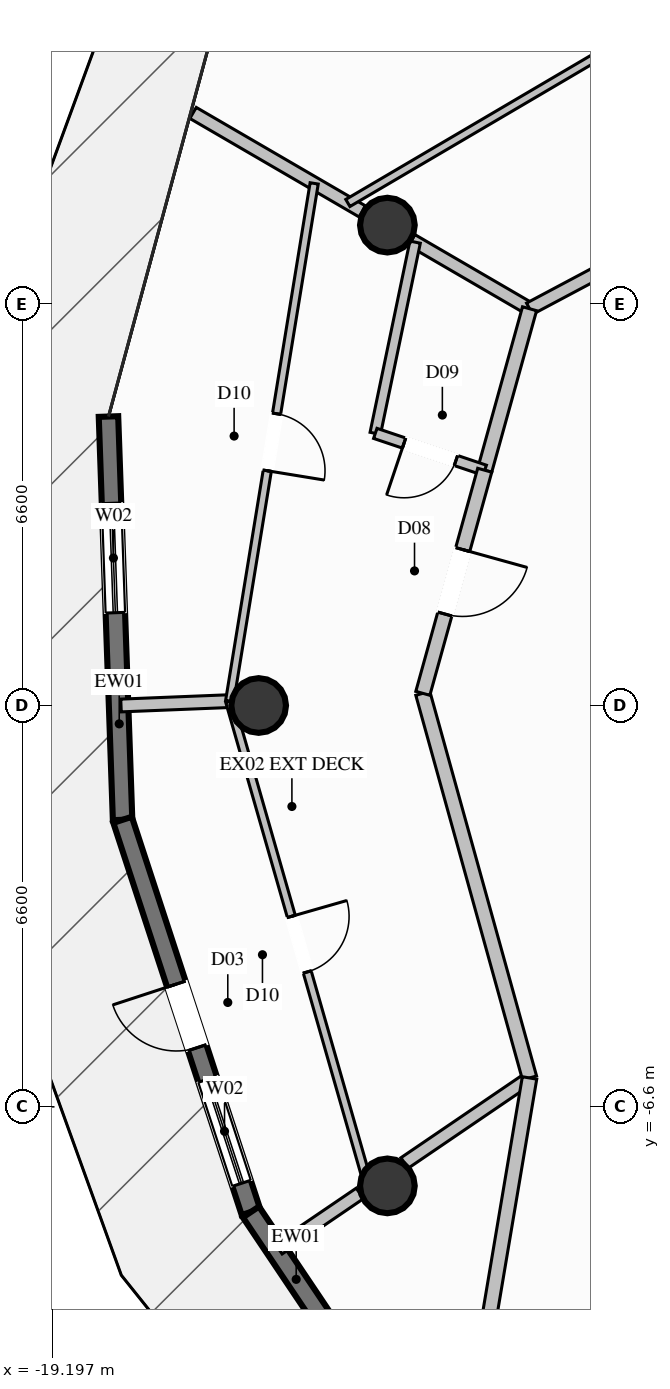
"""IFC4 building model, lengths in metres.
Left out: names, types, materials, properties, quantities, classifications, styles, units other than length and angle.
Written with IfcOpenShell. Run it as: python <this file> out.ifc"""

import sys

from ifc_helpers import new_model, si_unit, direction, frame, frame_2d, origin, origin_2d, place, context, subcontext, project, spatial, rectangle, circle, extrude, element, fill, save


model = new_model("IFC4")
c1 = context("Model", 3, precision=1e-05, world=origin(), true_north=direction((0.0, 1.0)))
c2 = subcontext(c1, "Body", "Model", "MODEL_VIEW")
j1 = project(units=[si_unit("LENGTHUNIT", "METRE"), si_unit("PLANEANGLEUNIT", "RADIAN")], contexts=[c1])
p1 = place(None, origin())
s1 = spatial("IfcSite", under=j1, at=p1, CompositionType="ELEMENT")
p2 = place(p1, origin())
s2 = spatial("IfcBuilding", under=s1, at=p2, CompositionType="ELEMENT")
p3 = place(p2, frame((0.0, 0.0, 202.0)))
s3 = spatial("IfcBuildingStorey", under=s2, at=p3, CompositionType="ELEMENT", Elevation=202.0)
for number, where, z_axis, x_axis in (
    (1, (-13.683, 7.9, 0.0), (0.0, 0.0, 1.0), (1.0, 0.0, 0.0)),
    (2, (-15.8, 0.0, 0.0), (0.0, 0.0, 1.0), (1.0, 0.0, 0.0)),
    (3, (-13.683, -7.9, 0.0), (0.0, 0.0, 1.0), (1.0, 0.0, 0.0)),
):
    element("IfcColumn", number, at=place(p3, frame(where, z_axis=z_axis, x_axis=x_axis)), inside=s3, PredefinedType="COLUMN", context=c2, shape_type="SweptSolid", body=[
        extrude(circle(Radius=0.45, at=origin_2d()), origin(), (0.0, 0.0, 1.0), 3.6),
    ])
p4 = place(p3, frame((-18.038, -1.88, 0.0), z_axis=(0.0, 0.0, 1.0), x_axis=(-0.034951390179, 0.99938901351, 0.0)))
e4 = element("IfcWall", 4, at=p4, inside=s3, PredefinedType="SOLIDWALL", context=c2, shape_type="SweptSolid", body=[
    extrude(rectangle(XDim=6.636, YDim=0.32, at=frame_2d((3.318, 0.0))), origin(), (0.0, 0.0, 1.0), 3.36),
])
p5 = place(p4, frame((3.408, 0.0, 0.35)))
e5 = element("IfcOpeningElement", 5, at=p5, cuts=e4, PredefinedType="OPENING", context=c2, shape_type="SweptSolid", body=[
    extrude(rectangle(XDim=1.8, YDim=2.6, at=frame_2d((0.9, 1.3))), frame((0.0, 0.17, 0.0), z_axis=(0.0, -1.0, 0.0), x_axis=(1.0, 0.0, 0.0)), (0.0, 0.0, 1.0), 0.34),
])
p6 = place(p3, frame((-15.927, -8.329, 0.0), z_axis=(0.0, 0.0, 1.0), x_axis=(-0.311096372271, 0.950378370524, 0.0)))
e6 = element("IfcWall", 6, at=p6, inside=s3, PredefinedType="SOLIDWALL", context=c2, shape_type="SweptSolid", body=[
    extrude(rectangle(XDim=6.786, YDim=0.32, at=frame_2d((3.393, 0.0))), origin(), (0.0, 0.0, 1.0), 3.36),
])
p7 = place(p6, frame((0.496, 0.0, 0.35)))
e7 = element("IfcOpeningElement", 7, at=p7, cuts=e6, PredefinedType="OPENING", context=c2, shape_type="SweptSolid", body=[
    extrude(rectangle(XDim=1.8, YDim=2.6, at=frame_2d((0.9, 1.3))), frame((0.0, 0.17, 0.0), z_axis=(0.0, -1.0, 0.0), x_axis=(1.0, 0.0, 0.0)), (0.0, 0.0, 1.0), 0.34),
])
p8 = place(p6, frame((2.843, 0.0, 0.0)))
e8 = element("IfcOpeningElement", 8, at=p8, cuts=e6, PredefinedType="OPENING", context=c2, shape_type="SweptSolid", body=[
    extrude(rectangle(XDim=1.1, YDim=2.2, at=frame_2d((0.55, 1.1))), frame((0.0, 0.17, 0.0), z_axis=(0.0, -1.0, 0.0), x_axis=(1.0, 0.0, 0.0)), (0.0, 0.0, 1.0), 0.34),
])
p9 = place(p3, frame((-12.145, -13.962, 0.0), z_axis=(0.0, 0.0, 1.0), x_axis=(-0.557429227347, 0.830224461516, 0.0)))
e9 = element("IfcWall", 9, at=p9, inside=s3, PredefinedType="SOLIDWALL", context=c2, shape_type="SweptSolid", body=[
    extrude(rectangle(XDim=6.785, YDim=0.32, at=frame_2d((3.392, 0.0))), origin(), (0.0, 0.0, 1.0), 3.36),
])
p10 = place(p9, frame((2.065, 0.0, 0.35)))
e10 = element("IfcOpeningElement", 10, at=p10, cuts=e9, PredefinedType="OPENING", context=c2, shape_type="SweptSolid", body=[
    extrude(rectangle(XDim=1.8, YDim=2.6, at=frame_2d((0.9, 1.3))), frame((0.0, 0.17, 0.0), z_axis=(0.0, -1.0, 0.0), x_axis=(1.0, 0.0, 0.0)), (0.0, 0.0, 1.0), 0.34),
])
p11 = place(p3, frame((-11.345, 6.525, 0.0), z_axis=(0.0, 0.0, 1.0), x_axis=(-0.864228712324, 0.5030991282, 0.0)))
e11 = element("IfcWall", 11, at=p11, inside=s3, PredefinedType="PARTITIONING", context=c2, shape_type="SweptSolid", body=[
    extrude(rectangle(XDim=2.242, YDim=0.21, at=frame_2d((1.121, 0.0))), origin(), (0.0, 0.0, 1.0), 2.801),
])
p12 = place(p3, frame((-14.095, 8.125, 0.0), z_axis=(0.0, 0.0, 1.0), x_axis=(-0.864298015092, 0.502980060348, 0.0)))
e12 = element("IfcWall", 12, at=p12, inside=s3, PredefinedType="PARTITIONING", context=c2, shape_type="SweptSolid", body=[
    extrude(rectangle(XDim=3.221, YDim=0.21, at=frame_2d((1.61, 0.0))), origin(), (0.0, 0.0, 1.0), 3.36),
])
p13 = place(p3, frame((-11.345, -6.125, 0.0), z_axis=(0.0, 0.0, 1.0), x_axis=(-0.82675664011, -0.562559737303, 0.0)))
e13 = element("IfcWall", 13, at=p13, inside=s3, PredefinedType="PARTITIONING", context=c2, shape_type="SweptSolid", body=[
    extrude(rectangle(XDim=2.487, YDim=0.21, at=frame_2d((1.243, 0.0))), origin(), (0.0, 0.0, 1.0), 2.801),
])
p14 = place(p3, frame((-14.136, -8.024, 0.0), z_axis=(0.0, 0.0, 1.0), x_axis=(-0.826904032376, -0.562343063654, 0.0)))
e14 = element("IfcWall", 14, at=p14, inside=s3, PredefinedType="PARTITIONING", context=c2, shape_type="SweptSolid", body=[
    extrude(rectangle(XDim=1.617, YDim=0.21, at=frame_2d((0.808, 0.0))), origin(), (0.0, 0.0, 1.0), 3.36),
])
p15 = place(p3, frame((-11.345, 6.525, 0.0), z_axis=(0.0, 0.0, 1.0), x_axis=(0.882866201619, 0.469624605445, 0.0)))
e15 = element("IfcWall", 15, at=p15, inside=s3, PredefinedType="PARTITIONING", context=c2, shape_type="SweptSolid", body=[
    extrude(rectangle(XDim=4.525, YDim=0.21, at=frame_2d((2.262, 0.0))), origin(), (0.0, 0.0, 1.0), 3.36),
])
p16 = place(p3, frame((-14.333, 8.264, 0.0), z_axis=(0.0, 0.0, 1.0), x_axis=(0.862118932007, 0.506705976948, 0.0)))
e16 = element("IfcWall", 16, at=p16, inside=s3, PredefinedType="PARTITIONING", context=c2, shape_type="SweptSolid", body=[
    extrude(rectangle(XDim=13.213, YDim=0.135, at=frame_2d((6.606, 0.0))), origin(), (0.0, 0.0, 1.0), 2.929),
])
p17 = place(p16, frame((6.131, 0.0, 0.0)))
e17 = element("IfcOpeningElement", 17, at=p17, cuts=e16, PredefinedType="OPENING", context=c2, shape_type="SweptSolid", body=[
    extrude(rectangle(XDim=0.95, YDim=2.1, at=frame_2d((0.475, 1.05))), frame((0.0, 0.078, 0.0), z_axis=(0.0, -1.0, 0.0), x_axis=(1.0, 0.0, 0.0)), (0.0, 0.0, 1.0), 0.155),
])
p18 = place(p3, frame((-11.345, 6.525, 0.0), z_axis=(0.0, 0.0, 1.0), x_axis=(-0.267401739017, -0.963585133743, 0.0)))
e18 = element("IfcWall", 18, at=p18, inside=s3, PredefinedType="PARTITIONING", context=c2, shape_type="SweptSolid", body=[
    extrude(rectangle(XDim=2.756, YDim=0.24, at=frame_2d((1.378, 0.0))), origin(), (0.0, 0.0, 1.0), 3.36),
])
p19 = place(p3, frame((-13.227, 7.62, 0.0), z_axis=(0.0, 0.0, 1.0), x_axis=(-0.203899627086, -0.978991798778, 0.0)))
e19 = element("IfcWall", 19, at=p19, inside=s3, PredefinedType="PLUMBINGWALL", context=c2, shape_type="SweptSolid", body=[
    extrude(rectangle(XDim=3.212, YDim=0.175, at=frame_2d((1.606, 0.0))), origin(), (0.0, 0.0, 1.0), 2.929),
])
p20 = place(p3, frame((-12.082, 3.869, 0.0), z_axis=(0.0, 0.0, 1.0), x_axis=(-0.947701891678, 0.319156896384, 0.0)))
e20 = element("IfcWall", 20, at=p20, inside=s3, PredefinedType="PLUMBINGWALL", context=c2, shape_type="SweptSolid", body=[
    extrude(rectangle(XDim=1.899, YDim=0.175, at=frame_2d((0.95, 0.0))), origin(), (0.0, 0.0, 1.0), 3.36),
])
p21 = place(p20, frame((0.5, 0.0, 0.0)))
e21 = element("IfcOpeningElement", 21, at=p21, cuts=e20, PredefinedType="OPENING", context=c2, shape_type="SweptSolid", body=[
    extrude(rectangle(XDim=0.9, YDim=2.1, at=frame_2d((0.45, 1.05))), frame((0.0, 0.098, 0.0), z_axis=(0.0, -1.0, 0.0), x_axis=(1.0, 0.0, 0.0)), (0.0, 0.0, 1.0), 0.195),
])
p22 = place(p3, frame((-16.277, 0.072, 0.0), z_axis=(0.0, 0.0, 1.0), x_axis=(-0.999188699438, -0.040273352416, 0.0)))
e22 = element("IfcWall", 22, at=p22, inside=s3, PredefinedType="PARTITIONING", context=c2, shape_type="SweptSolid", body=[
    extrude(rectangle(XDim=1.788, YDim=0.21, at=frame_2d((0.894, 0.0))), origin(), (0.0, 0.0, 1.0), 3.36),
])
p23 = place(p3, frame((-13.1, 0.2, 0.0), z_axis=(0.0, 0.0, 1.0), x_axis=(0.26738871748, -0.963588747218, 0.0)))
e23 = element("IfcWall", 23, at=p23, inside=s3, PredefinedType="PARTITIONING", context=c2, shape_type="SweptSolid", body=[
    extrude(rectangle(XDim=6.564, YDim=0.24, at=frame_2d((3.282, 0.0))), origin(), (0.0, 0.0, 1.0), 3.36),
])
p24 = place(p3, frame((-12.082, 3.869, 0.0), z_axis=(0.0, 0.0, 1.0), x_axis=(-0.267379290897, -0.963591362975, 0.0)))
e24 = element("IfcWall", 24, at=p24, inside=s3, PredefinedType="PARTITIONING", context=c2, shape_type="SweptSolid", body=[
    extrude(rectangle(XDim=3.808, YDim=0.24, at=frame_2d((1.904, 0.0))), origin(), (0.0, 0.0, 1.0), 3.36),
])
p25 = place(p24, frame((1.354, 0.0, 0.0)))
e25 = element("IfcOpeningElement", 25, at=p25, cuts=e24, PredefinedType="OPENING", context=c2, shape_type="SweptSolid", body=[
    extrude(rectangle(XDim=1.1, YDim=2.3, at=frame_2d((0.55, 1.15))), frame((0.0, 0.13, 0.0), z_axis=(0.0, -1.0, 0.0), x_axis=(1.0, 0.0, 0.0)), (0.0, 0.0, 1.0), 0.26),
])
p26 = place(p3, frame((-14.887, 8.586, 0.0), z_axis=(0.0, 0.0, 1.0), x_axis=(-0.16114427543, -0.986930860038, 0.0)))
e26 = element("IfcWall", 26, at=p26, inside=s3, PredefinedType="PARTITIONING", context=c2, shape_type="SweptSolid", body=[
    extrude(rectangle(XDim=8.627, YDim=0.135, at=frame_2d((4.313, 0.0))), origin(), (0.0, 0.0, 1.0), 2.929),
])
p27 = place(p26, frame((3.838, 0.0, 0.0)))
e27 = element("IfcOpeningElement", 27, at=p27, cuts=e26, PredefinedType="OPENING", context=c2, shape_type="SweptSolid", body=[
    extrude(rectangle(XDim=0.95, YDim=2.1, at=frame_2d((0.475, 1.05))), frame((0.0, 0.078, 0.0), z_axis=(0.0, -1.0, 0.0), x_axis=(1.0, 0.0, 0.0)), (0.0, 0.0, 1.0), 0.155),
])
p28 = place(p3, frame((-16.277, 0.072, 0.0), z_axis=(0.0, 0.0, 1.0), x_axis=(0.275388011089, -0.961333159393, 0.0)))
e28 = element("IfcWall", 28, at=p28, inside=s3, PredefinedType="PARTITIONING", context=c2, shape_type="SweptSolid", body=[
    extrude(rectangle(XDim=8.316, YDim=0.135, at=frame_2d((4.158, 0.0))), origin(), (0.0, 0.0, 1.0), 2.929),
])
p29 = place(p28, frame((3.683, 0.0, 0.0)))
e29 = element("IfcOpeningElement", 29, at=p29, cuts=e28, PredefinedType="OPENING", context=c2, shape_type="SweptSolid", body=[
    extrude(rectangle(XDim=0.95, YDim=2.1, at=frame_2d((0.475, 1.05))), frame((0.0, 0.078, 0.0), z_axis=(0.0, -1.0, 0.0), x_axis=(1.0, 0.0, 0.0)), (0.0, 0.0, 1.0), 0.155),
])
p30 = place(p3, frame((-11.345, -6.125, 0.0), z_axis=(0.0, 0.0, 1.0), x_axis=(-0.165960421789, -0.986132414232, 0.0)))
e30 = element("IfcWall", 30, at=p30, inside=s3, PredefinedType="PARTITIONING", context=c2, shape_type="SweptSolid", body=[
    extrude(rectangle(XDim=5.755, YDim=0.24, at=frame_2d((2.877, 0.0))), origin(), (0.0, 0.0, 1.0), 3.36),
])
p31 = place(p5, origin())
e31 = element("IfcWindow", 31, at=p31, inside=s3, PartitioningType="SINGLE_PANEL", PredefinedType="WINDOW", context=c2, shape_type="SweptSolid", body=[
    extrude(rectangle(XDim=1.8, YDim=2.6, at=frame_2d((0.9, 1.3))), frame((0.0, 0.03, 0.0), z_axis=(0.0, -1.0, 0.0), x_axis=(1.0, 0.0, 0.0)), (0.0, 0.0, 1.0), 0.06),
])
fill(e5, e31)
p32 = place(p7, origin())
e32 = element("IfcWindow", 32, at=p32, inside=s3, PartitioningType="SINGLE_PANEL", PredefinedType="WINDOW", context=c2, shape_type="SweptSolid", body=[
    extrude(rectangle(XDim=1.8, YDim=2.6, at=frame_2d((0.9, 1.3))), frame((0.0, 0.03, 0.0), z_axis=(0.0, -1.0, 0.0), x_axis=(1.0, 0.0, 0.0)), (0.0, 0.0, 1.0), 0.06),
])
fill(e7, e32)
p33 = place(p8, origin())
e33 = element("IfcDoor", 33, at=p33, inside=s3, OperationType="SINGLE_SWING_RIGHT", PredefinedType="DOOR", context=c2, shape_type="SweptSolid", body=[
    extrude(rectangle(XDim=1.1, YDim=2.2, at=frame_2d((0.55, 1.1))), frame((0.0, 0.025, 0.0), z_axis=(0.0, -1.0, 0.0), x_axis=(1.0, 0.0, 0.0)), (0.0, 0.0, 1.0), 0.05),
])
fill(e8, e33)
p34 = place(p21, origin())
e34 = element("IfcDoor", 34, at=p34, inside=s3, OperationType="SINGLE_SWING_RIGHT", PredefinedType="DOOR", context=c2, shape_type="SweptSolid", body=[
    extrude(rectangle(XDim=0.9, YDim=2.1, at=frame_2d((0.45, 1.05))), frame((0.0, 0.025, 0.0), z_axis=(0.0, -1.0, 0.0), x_axis=(1.0, 0.0, 0.0)), (0.0, 0.0, 1.0), 0.05),
])
fill(e21, e34)
p35 = place(p25, origin())
e35 = element("IfcDoor", 35, at=p35, inside=s3, OperationType="SINGLE_SWING_LEFT", PredefinedType="DOOR", context=c2, shape_type="SweptSolid", body=[
    extrude(rectangle(XDim=1.1, YDim=2.3, at=frame_2d((0.55, 1.15))), frame((0.0, 0.025, 0.0), z_axis=(0.0, -1.0, 0.0), x_axis=(1.0, 0.0, 0.0)), (0.0, 0.0, 1.0), 0.05),
])
fill(e25, e35)
p36 = place(p27, origin())
e36 = element("IfcDoor", 36, at=p36, inside=s3, OperationType="SINGLE_SWING_RIGHT", PredefinedType="DOOR", context=c2, shape_type="SweptSolid", body=[
    extrude(rectangle(XDim=0.95, YDim=2.1, at=frame_2d((0.475, 1.05))), frame((0.0, 0.025, 0.0), z_axis=(0.0, -1.0, 0.0), x_axis=(1.0, 0.0, 0.0)), (0.0, 0.0, 1.0), 0.05),
])
fill(e27, e36)
p37 = place(p29, origin())
e37 = element("IfcDoor", 37, at=p37, inside=s3, OperationType="SINGLE_SWING_LEFT", PredefinedType="DOOR", context=c2, shape_type="SweptSolid", body=[
    extrude(rectangle(XDim=0.95, YDim=2.1, at=frame_2d((0.475, 1.05))), frame((0.0, 0.025, 0.0), z_axis=(0.0, -1.0, 0.0), x_axis=(1.0, 0.0, 0.0)), (0.0, 0.0, 1.0), 0.05),
])
fill(e29, e37)
save(model, sys.argv[1])
